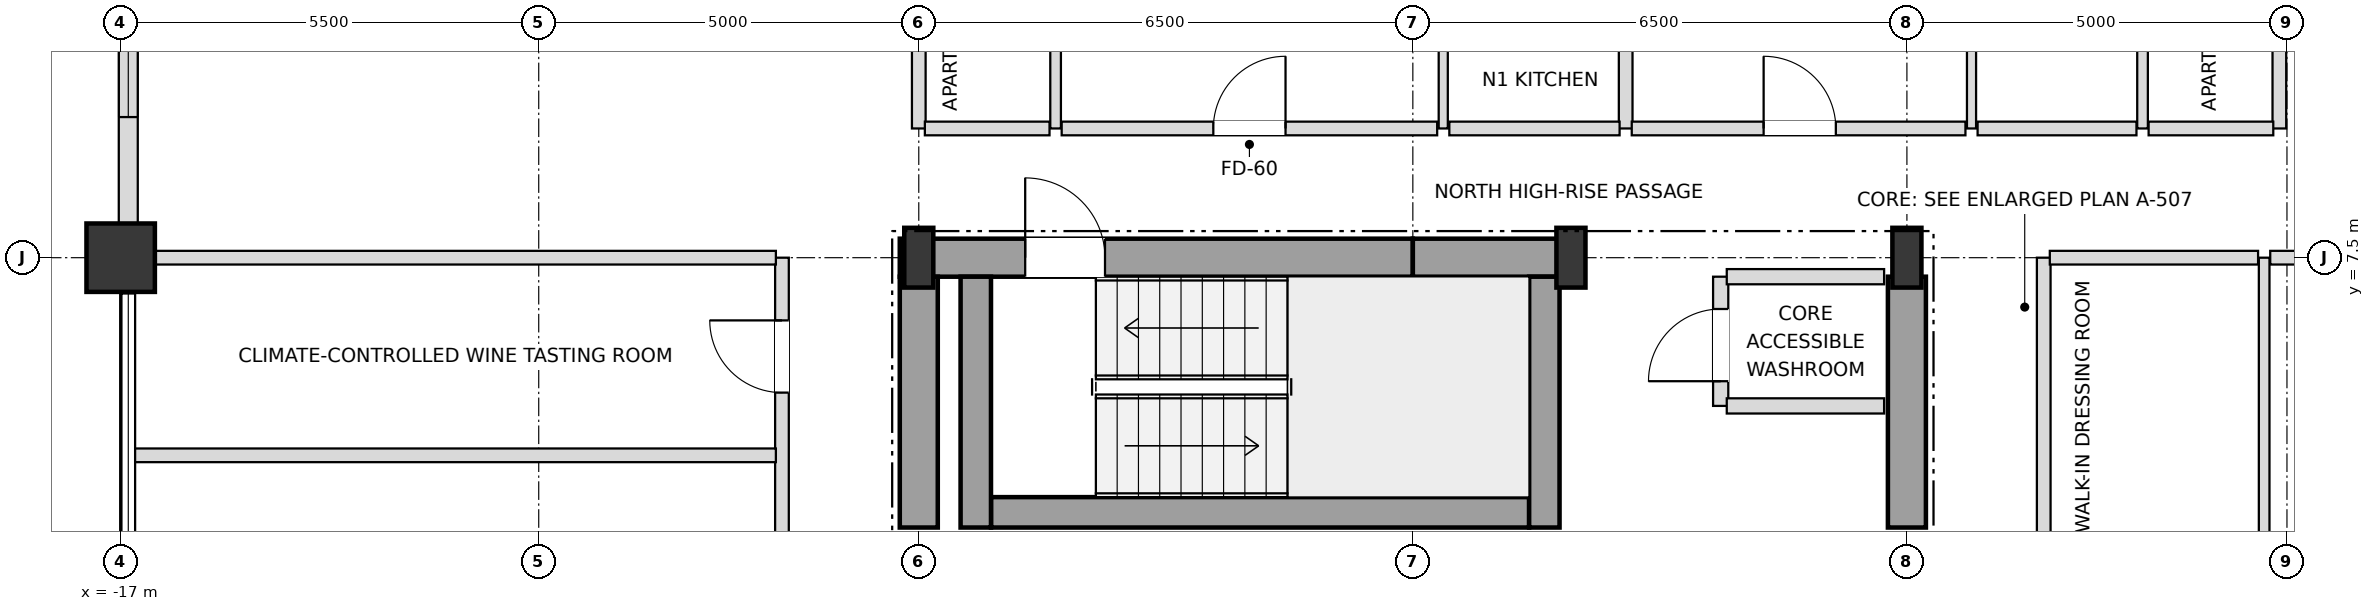
"""IFC4 building model, lengths in metres.
Left out: names, types, materials, properties, quantities, classifications, styles, units other than length and angle.
Written with IfcOpenShell. Run it as: python <this file> out.ifc"""

import sys

from ifc_helpers import new_model, si_unit, direction, frame, frame_2d, origin, origin_2d, place, context, subcontext, project, spatial, rectangle, i_section, extrude, element, fill, save


model = new_model("IFC4")
c1 = context("Model", 3, precision=1e-05, world=origin(), true_north=direction((0.0, 1.0)))
c2 = subcontext(c1, "Body", "Model", "MODEL_VIEW")
j1 = project(units=[si_unit("LENGTHUNIT", "METRE"), si_unit("PLANEANGLEUNIT", "RADIAN")], contexts=[c1])
p1 = place(None, origin())
s1 = spatial("IfcSite", under=j1, at=p1, CompositionType="ELEMENT")
p2 = place(p1, origin())
s2 = spatial("IfcBuilding", under=s1, at=p2, CompositionType="ELEMENT")
p3 = place(p2, frame((0.0, 0.0, 236.7)))
s3 = spatial("IfcBuildingStorey", under=s2, at=p3, CompositionType="ELEMENT", Elevation=236.7)
for number, where, z_axis, x_axis in (
    (1, (-6.5, 7.5, 0.0), (0.0, 0.0, 1.0), (1.0, 0.0, 0.0)),
    (2, (2.08, 7.5, 0.0), (0.0, 0.0, 1.0), (1.0, 0.0, 0.0)),
    (3, (6.5, 7.5, 0.0), (0.0, 0.0, 1.0), (1.0, 0.0, 0.0)),
):
    element("IfcColumn", number, at=place(p3, frame(where, z_axis=z_axis, x_axis=x_axis)), inside=s3, PredefinedType="COLUMN", context=c2, shape_type="SweptSolid", body=[
        extrude(i_section(OverallWidth=0.382, OverallDepth=0.786, WebThickness=0.02, FlangeThickness=0.033, at=origin_2d()), origin(), (0.0, 0.0, 1.0), 3.6),
    ])
p4 = place(p3, frame((-17.0, 7.5, 0.0), z_axis=(0.0, 0.0, 1.0), x_axis=(1.0, 0.0, 0.0)))
e4 = element("IfcColumn", 4, at=p4, inside=s3, PredefinedType="USERDEFINED", context=c2, shape_type="SweptSolid", body=[
    extrude(rectangle(XDim=0.9, YDim=0.9, at=origin_2d()), origin(), (0.0, 0.0, 1.0), 3.6),
])
p5 = place(p3, frame((-16.9, 12.555, 0.0), z_axis=(0.0, 0.0, 1.0), x_axis=(0.0, -1.0, 0.0)))
e5 = element("IfcWall", 5, at=p5, inside=s3, PredefinedType="SOLIDWALL", context=c2, shape_type="SweptSolid", body=[
    extrude(rectangle(XDim=4.61, YDim=0.25, at=frame_2d((2.305, 0.0))), origin(), (0.0, 0.0, 1.0), 2.748),
])
p6 = place(p5, frame((1.405, 0.0, 0.72)))
e6 = element("IfcOpeningElement", 6, at=p6, cuts=e5, PredefinedType="OPENING", context=c2, shape_type="SweptSolid", body=[
    extrude(rectangle(XDim=1.8, YDim=1.68, at=frame_2d((0.9, 0.84))), frame((0.0, 0.135, 0.0), z_axis=(0.0, -1.0, 0.0), x_axis=(1.0, 0.0, 0.0)), (0.0, 0.0, 1.0), 0.27),
])
p7 = place(p3, frame((-6.75, 7.5, 0.0), z_axis=(0.0, 0.0, 1.0), x_axis=(1.0, 0.0, 0.0)))
e7 = element("IfcWall", 7, at=p7, inside=s3, PredefinedType="SHEAR", context=c2, shape_type="SweptSolid", body=[
    extrude(rectangle(XDim=6.75, YDim=0.5, at=frame_2d((3.375, 0.0))), origin(), (0.0, 0.0, 1.0), 3.38),
])
p8 = place(p7, frame((1.65, 0.0, 0.0)))
e8 = element("IfcOpeningElement", 8, at=p8, cuts=e7, PredefinedType="OPENING", context=c2, shape_type="SweptSolid", body=[
    extrude(rectangle(XDim=1.05, YDim=2.15, at=frame_2d((0.525, 1.075))), frame((0.0, 0.26, 0.0), z_axis=(0.0, -1.0, 0.0), x_axis=(1.0, 0.0, 0.0)), (0.0, 0.0, 1.0), 0.52),
])
p9 = place(p3, frame((0.0, 7.5, 0.0), z_axis=(0.0, 0.0, 1.0), x_axis=(1.0, 0.0, 0.0)))
e9 = element("IfcWall", 9, at=p9, inside=s3, PredefinedType="SHEAR", context=c2, shape_type="SweptSolid", body=[
    extrude(rectangle(XDim=2.08, YDim=0.5, at=frame_2d((1.04, 0.0))), origin(), (0.0, 0.0, 1.0), 3.38),
])
for number, where, z_axis, x_axis in (
    (10, (-6.5, 3.95, 0.0), (0.0, 0.0, 1.0), (0.0, 1.0, 0.0)),
    (11, (6.5, 3.95, 0.0), (0.0, 0.0, 1.0), (0.0, 1.0, 0.0)),
):
    element("IfcWall", number, at=place(p3, frame(where, z_axis=z_axis, x_axis=x_axis)), inside=s3, PredefinedType="SHEAR", context=c2, shape_type="SweptSolid", body=[
        extrude(rectangle(XDim=3.3, YDim=0.5, at=frame_2d((1.65, 0.0))), origin(), (0.0, 0.0, 1.0), 3.38),
    ])
p10 = place(p3, frame((-5.55, 4.15, 0.0), z_axis=(0.0, 0.0, 1.0), x_axis=(1.0, 0.0, 0.0)))
e12 = element("IfcWall", 12, at=p10, inside=s3, PredefinedType="SHEAR", context=c2, shape_type="SweptSolid", body=[
    extrude(rectangle(XDim=7.08, YDim=0.4, at=frame_2d((3.54, 0.0))), origin(), (0.0, 0.0, 1.0), 3.38),
])
for number, where, z_axis, x_axis in (
    (13, (1.73, 3.95, 0.0), (0.0, 0.0, 1.0), (0.0, 1.0, 0.0)),
    (14, (-5.75, 3.95, 0.0), (0.0, 0.0, 1.0), (0.0, 1.0, 0.0)),
):
    element("IfcWall", number, at=place(p3, frame(where, z_axis=z_axis, x_axis=x_axis)), inside=s3, PredefinedType="SHEAR", context=c2, shape_type="SweptSolid", body=[
        extrude(rectangle(XDim=3.3, YDim=0.4, at=frame_2d((1.65, 0.0))), origin(), (0.0, 0.0, 1.0), 3.38),
    ])
p11 = place(p3, frame((-8.3, -7.5, 0.0), z_axis=(0.0, 0.0, 1.0), x_axis=(0.0, 1.0, 0.0)))
e15 = element("IfcWall", 15, at=p11, inside=s3, PredefinedType="PARTITIONING", context=c2, shape_type="SweptSolid", body=[
    extrude(rectangle(XDim=15.0, YDim=0.18, at=frame_2d((7.5, 0.0))), origin(), (0.0, 0.0, 1.0), 3.38),
])
p12 = place(p11, frame((2.075, 0.0, 0.0)))
e16 = element("IfcOpeningElement", 16, at=p12, cuts=e15, PredefinedType="OPENING", context=c2, shape_type="SweptSolid", body=[
    extrude(rectangle(XDim=0.95, YDim=2.15, at=frame_2d((0.475, 1.075))), frame((0.0, 0.1, 0.0), z_axis=(0.0, -1.0, 0.0), x_axis=(1.0, 0.0, 0.0)), (0.0, 0.0, 1.0), 0.2),
])
p13 = place(p11, frame((8.275, 0.0, 0.0)))
e17 = element("IfcOpeningElement", 17, at=p13, cuts=e15, PredefinedType="OPENING", context=c2, shape_type="SweptSolid", body=[
    extrude(rectangle(XDim=0.95, YDim=2.15, at=frame_2d((0.475, 1.075))), frame((0.0, 0.1, 0.0), z_axis=(0.0, -1.0, 0.0), x_axis=(1.0, 0.0, 0.0)), (0.0, 0.0, 1.0), 0.2),
])
p14 = place(p11, frame((13.225, 0.0, 0.0)))
e18 = element("IfcOpeningElement", 18, at=p14, cuts=e15, PredefinedType="OPENING", context=c2, shape_type="SweptSolid", body=[
    extrude(rectangle(XDim=0.95, YDim=2.15, at=frame_2d((0.475, 1.075))), frame((0.0, 0.1, 0.0), z_axis=(0.0, -1.0, 0.0), x_axis=(1.0, 0.0, 0.0)), (0.0, 0.0, 1.0), 0.2),
])
p15 = place(p3, frame((-6.5, 9.2, 0.0), z_axis=(0.0, 0.0, 1.0), x_axis=(0.0, 1.0, 0.0)))
e19 = element("IfcWall", 19, at=p15, inside=s3, PredefinedType="PARTITIONING", context=c2, shape_type="SweptSolid", body=[
    extrude(rectangle(XDim=10.7, YDim=0.18, at=frame_2d((5.35, 0.0))), origin(), (0.0, 0.0, 1.0), 2.826),
])
p16 = place(p3, frame((-4.7, 9.2, 0.0), z_axis=(0.0, 0.0, 1.0), x_axis=(0.0, 1.0, 0.0)))
e20 = element("IfcWall", 20, at=p16, inside=s3, PredefinedType="PARTITIONING", context=c2, shape_type="SweptSolid", body=[
    extrude(rectangle(XDim=4.7, YDim=0.14, at=frame_2d((2.35, 0.0))), origin(), (0.0, 0.0, 1.0), 3.38),
])
p17 = place(p16, frame((1.9, 0.0, 0.0)))
e21 = element("IfcOpeningElement", 21, at=p17, cuts=e20, PredefinedType="OPENING", context=c2, shape_type="SweptSolid", body=[
    extrude(rectangle(XDim=0.9, YDim=2.1, at=frame_2d((0.45, 1.05))), frame((0.0, 0.08, 0.0), z_axis=(0.0, -1.0, 0.0), x_axis=(1.0, 0.0, 0.0)), (0.0, 0.0, 1.0), 0.16),
])
p18 = place(p3, frame((0.4, 9.2, 0.0), z_axis=(0.0, 0.0, 1.0), x_axis=(0.0, 1.0, 0.0)))
e22 = element("IfcWall", 22, at=p18, inside=s3, PredefinedType="PARTITIONING", context=c2, shape_type="SweptSolid", body=[
    extrude(rectangle(XDim=4.7, YDim=0.12, at=frame_2d((2.35, 0.0))), origin(), (0.0, 0.0, 1.0), 3.38),
])
p19 = place(p18, frame((1.875, 0.0, 0.0)))
e23 = element("IfcOpeningElement", 23, at=p19, cuts=e22, PredefinedType="OPENING", context=c2, shape_type="SweptSolid", body=[
    extrude(rectangle(XDim=0.95, YDim=2.1, at=frame_2d((0.475, 1.05))), frame((0.0, 0.07, 0.0), z_axis=(0.0, -1.0, 0.0), x_axis=(1.0, 0.0, 0.0)), (0.0, 0.0, 1.0), 0.14),
])
p20 = place(p3, frame((2.8, 9.2, 0.0), z_axis=(0.0, 0.0, 1.0), x_axis=(0.0, 1.0, 0.0)))
e24 = element("IfcWall", 24, at=p20, inside=s3, PredefinedType="PARTITIONING", context=c2, shape_type="SweptSolid", body=[
    extrude(rectangle(XDim=10.7, YDim=0.18, at=frame_2d((5.35, 0.0))), origin(), (0.0, 0.0, 1.0), 3.018),
])
p21 = place(p3, frame((4.05, 5.55, 0.0), z_axis=(0.0, 0.0, 1.0), x_axis=(0.0, 1.0, 0.0)))
e25 = element("IfcWall", 25, at=p21, inside=s3, PredefinedType="SOLIDWALL", context=c2, shape_type="SweptSolid", body=[
    extrude(rectangle(XDim=1.7, YDim=0.2, at=frame_2d((0.85, 0.0))), origin(), (0.0, 0.0, 1.0), 3.38),
])
p22 = place(p21, frame((0.325, 0.0, 0.0)))
e26 = element("IfcOpeningElement", 26, at=p22, cuts=e25, PredefinedType="OPENING", context=c2, shape_type="SweptSolid", body=[
    extrude(rectangle(XDim=0.95, YDim=2.15, at=frame_2d((0.475, 1.075))), frame((0.0, 0.11, 0.0), z_axis=(0.0, -1.0, 0.0), x_axis=(1.0, 0.0, 0.0)), (0.0, 0.0, 1.0), 0.22),
])
p23 = place(p3, frame((7.35, 9.2, 0.0), z_axis=(0.0, 0.0, 1.0), x_axis=(0.0, 1.0, 0.0)))
e27 = element("IfcWall", 27, at=p23, inside=s3, PredefinedType="PARTITIONING", context=c2, shape_type="SweptSolid", body=[
    extrude(rectangle(XDim=10.7, YDim=0.12, at=frame_2d((5.35, 0.0))), origin(), (0.0, 0.0, 1.0), 2.826),
])
p24 = place(p23, frame((1.875, 0.0, 0.0)))
e28 = element("IfcOpeningElement", 28, at=p24, cuts=e27, PredefinedType="OPENING", context=c2, shape_type="SweptSolid", body=[
    extrude(rectangle(XDim=0.95, YDim=2.1, at=frame_2d((0.475, 1.05))), frame((0.0, 0.07, 0.0), z_axis=(0.0, -1.0, 0.0), x_axis=(1.0, 0.0, 0.0)), (0.0, 0.0, 1.0), 0.14),
])
p25 = place(p23, frame((7.25, 0.0, 0.0)))
e29 = element("IfcOpeningElement", 29, at=p25, cuts=e27, PredefinedType="OPENING", context=c2, shape_type="SweptSolid", body=[
    extrude(rectangle(XDim=0.9, YDim=2.1, at=frame_2d((0.45, 1.05))), frame((0.0, 0.07, 0.0), z_axis=(0.0, -1.0, 0.0), x_axis=(1.0, 0.0, 0.0)), (0.0, 0.0, 1.0), 0.14),
])
p26 = place(p3, frame((8.3, -7.5, 0.0), z_axis=(0.0, 0.0, 1.0), x_axis=(0.0, 1.0, 0.0)))
e30 = element("IfcWall", 30, at=p26, inside=s3, PredefinedType="PARTITIONING", context=c2, shape_type="SweptSolid", body=[
    extrude(rectangle(XDim=15.0, YDim=0.18, at=frame_2d((7.5, 0.0))), origin(), (0.0, 0.0, 1.0), 3.38),
])
p27 = place(p26, frame((2.355, 0.0, 0.0)))
e31 = element("IfcOpeningElement", 31, at=p27, cuts=e30, PredefinedType="OPENING", context=c2, shape_type="SweptSolid", body=[
    extrude(rectangle(XDim=0.95, YDim=2.15, at=frame_2d((0.475, 1.075))), frame((0.0, 0.1, 0.0), z_axis=(0.0, -1.0, 0.0), x_axis=(1.0, 0.0, 0.0)), (0.0, 0.0, 1.0), 0.2),
])
p28 = place(p3, frame((9.6, 9.2, 0.0), z_axis=(0.0, 0.0, 1.0), x_axis=(0.0, 1.0, 0.0)))
e32 = element("IfcWall", 32, at=p28, inside=s3, PredefinedType="PARTITIONING", context=c2, shape_type="SweptSolid", body=[
    extrude(rectangle(XDim=4.7, YDim=0.14, at=frame_2d((2.35, 0.0))), origin(), (0.0, 0.0, 1.0), 2.826),
])
p29 = place(p28, frame((1.9, 0.0, 0.0)))
e33 = element("IfcOpeningElement", 33, at=p29, cuts=e32, PredefinedType="OPENING", context=c2, shape_type="SweptSolid", body=[
    extrude(rectangle(XDim=0.9, YDim=2.1, at=frame_2d((0.45, 1.05))), frame((0.0, 0.08, 0.0), z_axis=(0.0, -1.0, 0.0), x_axis=(1.0, 0.0, 0.0)), (0.0, 0.0, 1.0), 0.16),
])
p30 = place(p3, frame((11.2, -7.5, 0.0), z_axis=(0.0, 0.0, 1.0), x_axis=(0.0, 1.0, 0.0)))
e34 = element("IfcWall", 34, at=p30, inside=s3, PredefinedType="PARTITIONING", context=c2, shape_type="SweptSolid", body=[
    extrude(rectangle(XDim=15.0, YDim=0.14, at=frame_2d((7.5, 0.0))), origin(), (0.0, 0.0, 1.0), 3.38),
])
p31 = place(p30, frame((3.475, 0.0, 0.0)))
e35 = element("IfcOpeningElement", 35, at=p31, cuts=e34, PredefinedType="OPENING", context=c2, shape_type="SweptSolid", body=[
    extrude(rectangle(XDim=0.95, YDim=2.1, at=frame_2d((0.475, 1.05))), frame((0.0, 0.08, 0.0), z_axis=(0.0, -1.0, 0.0), x_axis=(1.0, 0.0, 0.0)), (0.0, 0.0, 1.0), 0.16),
])
p32 = place(p3, frame((11.4, 9.2, 0.0), z_axis=(0.0, 0.0, 1.0), x_axis=(0.0, 1.0, 0.0)))
e36 = element("IfcWall", 36, at=p32, inside=s3, PredefinedType="PARTITIONING", context=c2, shape_type="SweptSolid", body=[
    extrude(rectangle(XDim=5.07, YDim=0.18, at=frame_2d((2.535, 0.0))), origin(), (0.0, 0.0, 1.0), 2.748),
])
p33 = place(p3, frame((-16.82, 4.9, 0.0), z_axis=(0.0, 0.0, 1.0), x_axis=(1.0, 0.0, 0.0)))
e37 = element("IfcWall", 37, at=p33, inside=s3, PredefinedType="PARTITIONING", context=c2, shape_type="SweptSolid", body=[
    extrude(rectangle(XDim=8.44, YDim=0.18, at=frame_2d((4.22, 0.0))), origin(), (0.0, 0.0, 1.0), 3.018),
])
for number, where, z_axis, x_axis in (
    (38, (4.13, 5.55, 0.0), (0.0, 0.0, 1.0), (1.0, 0.0, 0.0)),
    (39, (4.13, 7.25, 0.0), (0.0, 0.0, 1.0), (1.0, 0.0, 0.0)),
):
    element("IfcWall", number, at=place(p3, frame(where, z_axis=z_axis, x_axis=x_axis)), inside=s3, PredefinedType="SOLIDWALL", context=c2, shape_type="SweptSolid", body=[
        extrude(rectangle(XDim=2.07, YDim=0.2, at=frame_2d((1.035, 0.0))), origin(), (0.0, 0.0, 1.0), 3.38),
    ])
p34 = place(p3, frame((-16.9, 7.5, 0.0), z_axis=(0.0, 0.0, 1.0), x_axis=(1.0, 0.0, 0.0)))
e40 = element("IfcWall", 40, at=p34, inside=s3, PredefinedType="PARTITIONING", context=c2, shape_type="SweptSolid", body=[
    extrude(rectangle(XDim=8.52, YDim=0.18, at=frame_2d((4.26, 0.0))), origin(), (0.0, 0.0, 1.0), 2.826),
])
p35 = place(p3, frame((8.38, 7.5, 0.0), z_axis=(0.0, 0.0, 1.0), x_axis=(1.0, 0.0, 0.0)))
e41 = element("IfcWall", 41, at=p35, inside=s3, PredefinedType="PARTITIONING", context=c2, shape_type="SweptSolid", body=[
    extrude(rectangle(XDim=2.74, YDim=0.18, at=frame_2d((1.37, 0.0))), origin(), (0.0, 0.0, 1.0), 2.826),
])
p36 = place(p3, frame((11.28, 7.5, 0.0), z_axis=(0.0, 0.0, 1.0), x_axis=(1.0, 0.0, 0.0)))
e42 = element("IfcWall", 42, at=p36, inside=s3, PredefinedType="PARTITIONING", context=c2, shape_type="SweptSolid", body=[
    extrude(rectangle(XDim=5.62, YDim=0.18, at=frame_2d((2.81, 0.0))), origin(), (0.0, 0.0, 1.0), 2.826),
])
p37 = place(p3, frame((-6.42, 9.2, 0.0), z_axis=(0.0, 0.0, 1.0), x_axis=(1.0, 0.0, 0.0)))
e43 = element("IfcWall", 43, at=p37, inside=s3, PredefinedType="PARTITIONING", context=c2, shape_type="SweptSolid", body=[
    extrude(rectangle(XDim=1.64, YDim=0.18, at=frame_2d((0.82, 0.0))), origin(), (0.0, 0.0, 1.0), 3.38),
])
p38 = place(p3, frame((-4.62, 9.2, 0.0), z_axis=(0.0, 0.0, 1.0), x_axis=(1.0, 0.0, 0.0)))
e44 = element("IfcWall", 44, at=p38, inside=s3, PredefinedType="PARTITIONING", context=c2, shape_type="SweptSolid", body=[
    extrude(rectangle(XDim=4.94, YDim=0.18, at=frame_2d((2.47, 0.0))), origin(), (0.0, 0.0, 1.0), 3.38),
])
p39 = place(p38, frame((1.995, 0.0, 0.0)))
e45 = element("IfcOpeningElement", 45, at=p39, cuts=e44, PredefinedType="OPENING", context=c2, shape_type="SweptSolid", body=[
    extrude(rectangle(XDim=0.95, YDim=2.15, at=frame_2d((0.475, 1.075))), frame((0.0, 0.1, 0.0), z_axis=(0.0, -1.0, 0.0), x_axis=(1.0, 0.0, 0.0)), (0.0, 0.0, 1.0), 0.2),
])
p40 = place(p3, frame((0.48, 9.2, 0.0), z_axis=(0.0, 0.0, 1.0), x_axis=(1.0, 0.0, 0.0)))
e46 = element("IfcWall", 46, at=p40, inside=s3, PredefinedType="PARTITIONING", context=c2, shape_type="SweptSolid", body=[
    extrude(rectangle(XDim=2.24, YDim=0.18, at=frame_2d((1.12, 0.0))), origin(), (0.0, 0.0, 1.0), 3.38),
])
p41 = place(p3, frame((2.88, 9.2, 0.0), z_axis=(0.0, 0.0, 1.0), x_axis=(1.0, 0.0, 0.0)))
e47 = element("IfcWall", 47, at=p41, inside=s3, PredefinedType="PARTITIONING", context=c2, shape_type="SweptSolid", body=[
    extrude(rectangle(XDim=4.39, YDim=0.18, at=frame_2d((2.195, 0.0))), origin(), (0.0, 0.0, 1.0), 2.826),
])
p42 = place(p41, frame((1.735, 0.0, 0.0)))
e48 = element("IfcOpeningElement", 48, at=p42, cuts=e47, PredefinedType="OPENING", context=c2, shape_type="SweptSolid", body=[
    extrude(rectangle(XDim=0.95, YDim=2.15, at=frame_2d((0.475, 1.075))), frame((0.0, 0.1, 0.0), z_axis=(0.0, -1.0, 0.0), x_axis=(1.0, 0.0, 0.0)), (0.0, 0.0, 1.0), 0.2),
])
p43 = place(p3, frame((7.43, 9.2, 0.0), z_axis=(0.0, 0.0, 1.0), x_axis=(1.0, 0.0, 0.0)))
e49 = element("IfcWall", 49, at=p43, inside=s3, PredefinedType="PARTITIONING", context=c2, shape_type="SweptSolid", body=[
    extrude(rectangle(XDim=2.09, YDim=0.18, at=frame_2d((1.045, 0.0))), origin(), (0.0, 0.0, 1.0), 3.38),
])
p44 = place(p3, frame((9.68, 9.2, 0.0), z_axis=(0.0, 0.0, 1.0), x_axis=(1.0, 0.0, 0.0)))
e50 = element("IfcWall", 50, at=p44, inside=s3, PredefinedType="PARTITIONING", context=c2, shape_type="SweptSolid", body=[
    extrude(rectangle(XDim=1.64, YDim=0.18, at=frame_2d((0.82, 0.0))), origin(), (0.0, 0.0, 1.0), 3.38),
])
p45 = place(p6, origin())
e51 = element("IfcWindow", 51, at=p45, inside=s3, PartitioningType="SINGLE_PANEL", PredefinedType="WINDOW", context=c2, shape_type="SweptSolid", body=[
    extrude(rectangle(XDim=1.8, YDim=1.68, at=frame_2d((0.9, 0.84))), frame((0.0, 0.03, 0.0), z_axis=(0.0, -1.0, 0.0), x_axis=(1.0, 0.0, 0.0)), (0.0, 0.0, 1.0), 0.06),
])
fill(e6, e51)
p46 = place(p8, origin())
e52 = element("IfcDoor", 52, at=p46, inside=s3, OperationType="SINGLE_SWING_LEFT", PredefinedType="DOOR", context=c2, shape_type="SweptSolid", body=[
    extrude(rectangle(XDim=1.05, YDim=2.15, at=frame_2d((0.525, 1.075))), frame((0.0, 0.025, 0.0), z_axis=(0.0, -1.0, 0.0), x_axis=(1.0, 0.0, 0.0)), (0.0, 0.0, 1.0), 0.05),
])
fill(e8, e52)
p47 = place(p22, origin())
e53 = element("IfcDoor", 53, at=p47, inside=s3, OperationType="SINGLE_SWING_LEFT", PredefinedType="DOOR", context=c2, shape_type="SweptSolid", body=[
    extrude(rectangle(XDim=0.95, YDim=2.15, at=frame_2d((0.475, 1.075))), frame((0.0, 0.025, 0.0), z_axis=(0.0, -1.0, 0.0), x_axis=(1.0, 0.0, 0.0)), (0.0, 0.0, 1.0), 0.05),
])
fill(e26, e53)
p48 = place(p39, origin())
e54 = element("IfcDoor", 54, at=p48, inside=s3, OperationType="SINGLE_SWING_RIGHT", PredefinedType="DOOR", context=c2, shape_type="SweptSolid", body=[
    extrude(rectangle(XDim=0.95, YDim=2.15, at=frame_2d((0.475, 1.075))), frame((0.0, 0.025, 0.0), z_axis=(0.0, -1.0, 0.0), x_axis=(1.0, 0.0, 0.0)), (0.0, 0.0, 1.0), 0.05),
])
fill(e45, e54)
p49 = place(p42, origin())
e55 = element("IfcDoor", 55, at=p49, inside=s3, OperationType="SINGLE_SWING_LEFT", PredefinedType="DOOR", context=c2, shape_type="SweptSolid", body=[
    extrude(rectangle(XDim=0.95, YDim=2.15, at=frame_2d((0.475, 1.075))), frame((0.0, 0.025, 0.0), z_axis=(0.0, -1.0, 0.0), x_axis=(1.0, 0.0, 0.0)), (0.0, 0.0, 1.0), 0.05),
])
fill(e48, e55)
p50 = place(p14, origin())
e56 = element("IfcDoor", 56, at=p50, inside=s3, OperationType="SINGLE_SWING_RIGHT", PredefinedType="DOOR", context=c2, shape_type="SweptSolid", body=[
    extrude(rectangle(XDim=0.95, YDim=2.15, at=frame_2d((0.475, 1.075))), frame((0.0, 0.025, 0.0), z_axis=(0.0, -1.0, 0.0), x_axis=(1.0, 0.0, 0.0)), (0.0, 0.0, 1.0), 0.05),
])
fill(e18, e56)
save(model, sys.argv[1])
